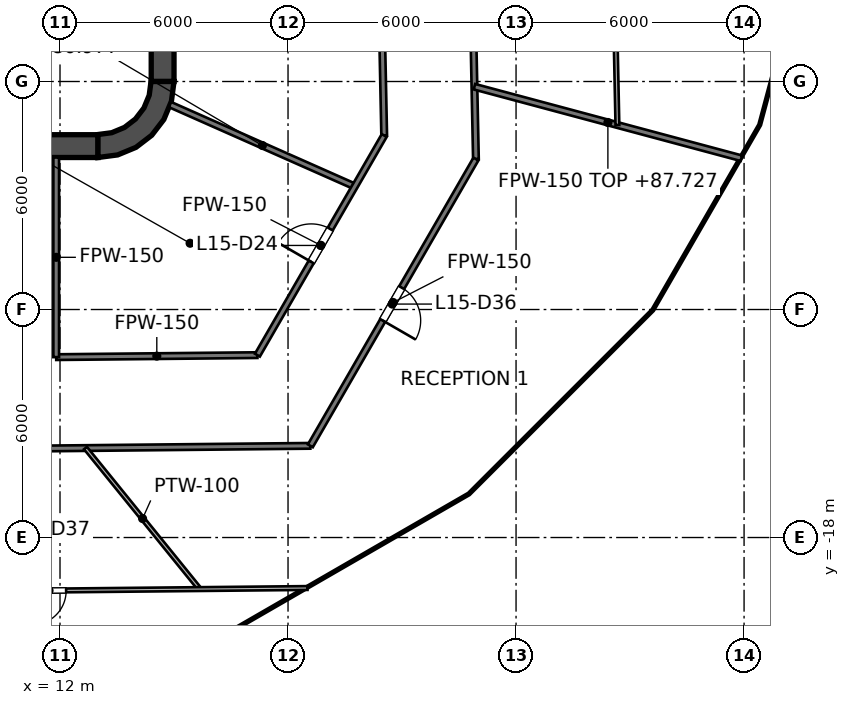
"""IFC4 building model, lengths in metres.
Left out: names, types, materials, properties, quantities, classifications, styles, units other than length and angle.
Written with IfcOpenShell. Run it as: python <this file> out.ifc"""

import sys

from ifc_helpers import new_model, si_unit, direction, frame, frame_2d, origin, place, context, subcontext, project, spatial, polyline, rectangle, outline, extrude, element, fill, save


model = new_model("IFC4")
c1 = context("Model", 3, precision=1e-05, world=origin(), true_north=direction((0.0, 1.0)))
c2 = subcontext(c1, "Body", "Model", "MODEL_VIEW")
j1 = project(units=[si_unit("LENGTHUNIT", "METRE"), si_unit("PLANEANGLEUNIT", "RADIAN")], contexts=[c1])
p1 = place(None, origin())
s1 = spatial("IfcSite", under=j1, at=p1, CompositionType="ELEMENT")
p2 = place(p1, origin())
s2 = spatial("IfcBuilding", under=s1, at=p2, CompositionType="ELEMENT")
p3 = place(p2, frame((0.0, 0.0, 84.0)))
s3 = spatial("IfcBuildingStorey", under=s2, at=p3, CompositionType="ELEMENT", Elevation=84.0)
p4 = place(p3, frame((-13.0, -7.7, 0.0), z_axis=(0.0, 0.0, 1.0), x_axis=(1.0, 0.0, 0.0)))
e1 = element("IfcWall", 1, at=p4, inside=s3, PredefinedType="SHEAR", context=c2, shape_type="SweptSolid", body=[
    extrude(rectangle(XDim=26.0, YDim=0.6, at=frame_2d((13.0, 0.0))), origin(), (0.0, 0.0, 1.0), 4.2),
])
p5 = place(p4, frame((1.7, 0.0, 0.0)))
e2 = element("IfcOpeningElement", 2, at=p5, cuts=e1, PredefinedType="OPENING", context=c2, shape_type="SweptSolid", body=[
    extrude(rectangle(XDim=1.8, YDim=2.1, at=frame_2d((0.9, 1.05))), frame((0.0, 0.3, 0.0), z_axis=(0.0, -1.0, 0.0), x_axis=(1.0, 0.0, 0.0)), (0.0, 0.0, 1.0), 0.6),
])
p6 = place(p4, frame((22.5, 0.0, 0.0)))
e3 = element("IfcOpeningElement", 3, at=p6, cuts=e1, PredefinedType="OPENING", context=c2, shape_type="SweptSolid", body=[
    extrude(rectangle(XDim=1.8, YDim=2.1, at=frame_2d((0.9, 1.05))), frame((0.0, 0.3, 0.0), z_axis=(0.0, -1.0, 0.0), x_axis=(1.0, 0.0, 0.0)), (0.0, 0.0, 1.0), 0.6),
])
p7 = place(p3, frame((14.7, -6.0, 0.0), z_axis=(0.0, 0.0, 1.0), x_axis=(0.0, 1.0, 0.0)))
e4 = element("IfcWall", 4, at=p7, inside=s3, PredefinedType="SHEAR", context=c2, shape_type="SweptSolid", body=[
    extrude(rectangle(XDim=12.0, YDim=0.6, at=frame_2d((6.0, 0.0))), origin(), (0.0, 0.0, 1.0), 4.2),
])
p8 = place(p3, origin())
e5 = element("IfcWall", 5, at=p8, inside=s3, PredefinedType="SHEAR", context=c2, shape_type="SweptSolid", body=[
    extrude(outline(polyline([(15.0, -6.0), (14.395, -6.0), (14.347, -6.361), (14.208, -6.698), (13.986, -6.986), (13.698, -7.208), (13.361, -7.347), (13.0, -7.395), (13.0, -8.0), (13.518, -7.932), (14.0, -7.732), (14.414, -7.414), (14.732, -7.0), (14.932, -6.518), (15.0, -6.0)])), origin(), (0.0, 0.0, 1.0), 4.2),
])
p9 = place(p3, frame((11.8, -7.4, 0.0), z_axis=(0.0, 0.0, 1.0), x_axis=(0.0, 1.0, 0.0)))
e6 = element("IfcWall", 6, at=p9, inside=s3, PredefinedType="SOLIDWALL", context=c2, shape_type="SweptSolid", body=[
    extrude(rectangle(XDim=14.8, YDim=0.4, at=frame_2d((7.4, 0.0))), origin(), (0.0, 0.0, 1.0), 4.05),
])
p10 = place(p9, frame((11.2, 0.0, 0.0)))
e7 = element("IfcOpeningElement", 7, at=p10, cuts=e6, PredefinedType="OPENING", context=c2, shape_type="SweptSolid", body=[
    extrude(rectangle(XDim=1.1, YDim=2.1, at=frame_2d((0.55, 1.05))), frame((0.0, 0.2, 0.0), z_axis=(0.0, -1.0, 0.0), x_axis=(1.0, 0.0, 0.0)), (0.0, 0.0, 1.0), 0.4),
])
p11 = place(p9, frame((8.3, 0.0, 0.0)))
e8 = element("IfcOpeningElement", 8, at=p11, cuts=e6, PredefinedType="OPENING", context=c2, shape_type="SweptSolid", body=[
    extrude(rectangle(XDim=1.1, YDim=2.1, at=frame_2d((0.55, 1.05))), frame((0.0, 0.2, 0.0), z_axis=(0.0, -1.0, 0.0), x_axis=(1.0, 0.0, 0.0)), (0.0, 0.0, 1.0), 0.4),
])
p12 = place(p9, frame((5.4, 0.0, 0.0)))
e9 = element("IfcOpeningElement", 9, at=p12, cuts=e6, PredefinedType="OPENING", context=c2, shape_type="SweptSolid", body=[
    extrude(rectangle(XDim=1.1, YDim=2.1, at=frame_2d((0.55, 1.05))), frame((0.0, 0.2, 0.0), z_axis=(0.0, -1.0, 0.0), x_axis=(1.0, 0.0, 0.0)), (0.0, 0.0, 1.0), 0.4),
])
p13 = place(p9, frame((13.552, 0.0, 0.0)))
e10 = element("IfcOpeningElement", 10, at=p13, cuts=e6, PredefinedType="OPENING", context=c2, shape_type="SweptSolid", body=[
    extrude(rectangle(XDim=0.9, YDim=2.1, at=frame_2d((0.45, 1.05))), frame((0.0, 0.2, 0.0), z_axis=(0.0, -1.0, 0.0), x_axis=(1.0, 0.0, 0.0)), (0.0, 0.0, 1.0), 0.4),
])
p14 = place(p9, frame((0.347, 0.0, 0.0)))
e11 = element("IfcOpeningElement", 11, at=p14, cuts=e6, PredefinedType="OPENING", context=c2, shape_type="SweptSolid", body=[
    extrude(rectangle(XDim=0.9, YDim=2.1, at=frame_2d((0.45, 1.05))), frame((0.0, 0.2, 0.0), z_axis=(0.0, -1.0, 0.0), x_axis=(1.0, 0.0, 0.0)), (0.0, 0.0, 1.0), 0.4),
])
e12 = element("IfcWall", 12, at=p8, inside=s3, PredefinedType="SOLIDWALL", context=c2, shape_type="SweptSolid", body=[
    extrude(outline(polyline([(12.0, -5.675), (12.0, -5.925), (14.15, -5.925), (14.4, -5.925), (14.4, -5.675), (14.4, -3.025), (14.4, -2.775), (14.4, -0.125), (14.4, 0.125), (14.4, 2.775), (14.4, 3.025), (14.4, 5.675), (14.4, 5.925), (14.15, 5.925), (12.0, 5.925), (12.0, 5.675), (14.15, 5.675), (14.15, 3.025), (12.0, 3.025), (12.0, 2.775), (14.15, 2.775), (14.15, 0.125), (12.0, 0.125), (12.0, -0.125), (14.15, -0.125), (14.15, -2.775), (12.0, -2.775), (12.0, -3.025), (14.15, -3.025), (14.15, -5.675), (12.0, -5.675)])), origin(), (0.0, 0.0, 1.0), 4.05),
])
p15 = place(p3, frame((20.167, 10.213, 0.0), z_axis=(0.0, 0.0, 1.0), x_axis=(0.020610894613, -0.999787572949, 0.0)))
e13 = element("IfcWall", 13, at=p15, inside=s3, PredefinedType="PARTITIONING", context=c2, shape_type="SweptSolid", body=[
    extrude(rectangle(XDim=17.637, YDim=0.15, at=frame_2d((8.819, 0.0))), origin(), (0.0, 0.0, 1.0), 2.968),
])
p16 = place(p15, frame((10.508, 0.0, 0.0)))
e14 = element("IfcOpeningElement", 14, at=p16, cuts=e13, PredefinedType="OPENING", context=c2, shape_type="SweptSolid", body=[
    extrude(rectangle(XDim=1.0, YDim=2.1, at=frame_2d((0.5, 1.05))), frame((0.0, 0.075, 0.0), z_axis=(0.0, -1.0, 0.0), x_axis=(1.0, 0.0, 0.0)), (0.0, 0.0, 1.0), 0.15),
])
p17 = place(p15, frame((5.09, 0.0, 0.0)))
e15 = element("IfcOpeningElement", 15, at=p17, cuts=e13, PredefinedType="OPENING", context=c2, shape_type="SweptSolid", body=[
    extrude(rectangle(XDim=1.0, YDim=2.1, at=frame_2d((0.5, 1.05))), frame((0.0, 0.075, 0.0), z_axis=(0.0, -1.0, 0.0), x_axis=(1.0, 0.0, 0.0)), (0.0, 0.0, 1.0), 0.15),
])
p18 = place(p3, frame((22.539, 11.615, 0.0), z_axis=(0.0, 0.0, 1.0), x_axis=(0.020601506683, -0.99978776644, 0.0)))
e16 = element("IfcWall", 16, at=p18, inside=s3, PredefinedType="PARTITIONING", context=c2, shape_type="SweptSolid", body=[
    extrude(rectangle(XDim=19.66, YDim=0.15, at=frame_2d((9.83, 0.0))), origin(), (0.0, 0.0, 1.0), 2.968),
])
p19 = place(p18, frame((13.54, 0.0, 0.0)))
e17 = element("IfcOpeningElement", 17, at=p19, cuts=e16, PredefinedType="OPENING", context=c2, shape_type="SweptSolid", body=[
    extrude(rectangle(XDim=1.0, YDim=2.1, at=frame_2d((0.5, 1.05))), frame((0.0, 0.075, 0.0), z_axis=(0.0, -1.0, 0.0), x_axis=(1.0, 0.0, 0.0)), (0.0, 0.0, 1.0), 0.15),
])
p20 = place(p18, frame((9.23, 0.0, 0.0)))
e18 = element("IfcOpeningElement", 18, at=p20, cuts=e16, PredefinedType="OPENING", context=c2, shape_type="SweptSolid", body=[
    extrude(rectangle(XDim=1.0, YDim=2.1, at=frame_2d((0.5, 1.05))), frame((0.0, 0.075, 0.0), z_axis=(0.0, -1.0, 0.0), x_axis=(1.0, 0.0, 0.0)), (0.0, 0.0, 1.0), 0.15),
])
p21 = place(p3, frame((14.895, -6.607, 0.0), z_axis=(0.0, 0.0, 1.0), x_axis=(0.914233271379, -0.405188259337, 0.0)))
e19 = element("IfcWall", 19, at=p21, inside=s3, PredefinedType="PARTITIONING", context=c2, shape_type="SweptSolid", body=[
    extrude(rectangle(XDim=5.317, YDim=0.15, at=frame_2d((2.659, 0.0))), origin(), (0.0, 0.0, 1.0), 2.977),
])
p22 = place(p3, frame((22.905, -6.137, 0.0), z_axis=(0.0, 0.0, 1.0), x_axis=(0.965915974273, -0.258855810529, 0.0)))
e20 = element("IfcWall", 20, at=p22, inside=s3, PredefinedType="PARTITIONING", context=c2, shape_type="SweptSolid", body=[
    extrude(rectangle(XDim=7.271, YDim=0.15, at=frame_2d((3.635, 0.0))), origin(), (0.0, 0.0, 1.0), 3.727),
])
p23 = place(p3, frame((-14.534, -15.916, 0.0), z_axis=(0.0, 0.0, 1.0), x_axis=(0.999950930262, 0.009906415532, 0.0)))
e21 = element("IfcWall", 21, at=p23, inside=s3, PredefinedType="PARTITIONING", context=c2, shape_type="SweptSolid", body=[
    extrude(rectangle(XDim=33.123, YDim=0.15, at=frame_2d((16.561, 0.0))), origin(), (0.0, 0.0, 1.0), 2.968),
])
p24 = place(p23, frame((22.477, 0.0, 0.0)))
e22 = element("IfcOpeningElement", 22, at=p24, cuts=e21, PredefinedType="OPENING", context=c2, shape_type="SweptSolid", body=[
    extrude(rectangle(XDim=1.0, YDim=2.1, at=frame_2d((0.5, 1.05))), frame((0.0, 0.075, 0.0), z_axis=(0.0, -1.0, 0.0), x_axis=(1.0, 0.0, 0.0)), (0.0, 0.0, 1.0), 0.15),
])
p25 = place(p23, frame((7.723, 0.0, 0.0)))
e23 = element("IfcOpeningElement", 23, at=p25, cuts=e21, PredefinedType="OPENING", context=c2, shape_type="SweptSolid", body=[
    extrude(rectangle(XDim=1.0, YDim=2.1, at=frame_2d((0.5, 1.05))), frame((0.0, 0.075, 0.0), z_axis=(0.0, -1.0, 0.0), x_axis=(1.0, 0.0, 0.0)), (0.0, 0.0, 1.0), 0.15),
])
p26 = place(p23, frame((16.111, 0.0, 0.0)))
e24 = element("IfcOpeningElement", 24, at=p26, cuts=e21, PredefinedType="OPENING", context=c2, shape_type="SweptSolid", body=[
    extrude(rectangle(XDim=1.0, YDim=2.1, at=frame_2d((0.5, 1.05))), frame((0.0, 0.075, 0.0), z_axis=(0.0, -1.0, 0.0), x_axis=(1.0, 0.0, 0.0)), (0.0, 0.0, 1.0), 0.15),
])
p27 = place(p3, frame((11.9, -13.253, 0.0), z_axis=(0.0, 0.0, 1.0), x_axis=(0.999950853109, 0.009914200296, 0.0)))
e25 = element("IfcWall", 25, at=p27, inside=s3, PredefinedType="PARTITIONING", context=c2, shape_type="SweptSolid", body=[
    extrude(rectangle(XDim=5.294, YDim=0.15, at=frame_2d((2.647, 0.0))), origin(), (0.0, 0.0, 1.0), 2.968),
])
p28 = place(p3, frame((18.587, -15.587, 0.0), z_axis=(0.0, 0.0, 1.0), x_axis=(0.500026433136, 0.866010142069, 0.0)))
e26 = element("IfcWall", 26, at=p28, inside=s3, PredefinedType="PARTITIONING", context=c2, shape_type="SweptSolid", body=[
    extrude(rectangle(XDim=8.713, YDim=0.15, at=frame_2d((4.357, 0.0))), origin(), (0.0, 0.0, 1.0), 2.968),
])
p29 = place(p28, frame((3.807, 0.0, 0.0)))
e27 = element("IfcOpeningElement", 27, at=p29, cuts=e26, PredefinedType="OPENING", context=c2, shape_type="SweptSolid", body=[
    extrude(rectangle(XDim=1.0, YDim=2.1, at=frame_2d((0.5, 1.05))), frame((0.0, 0.075, 0.0), z_axis=(0.0, -1.0, 0.0), x_axis=(1.0, 0.0, 0.0)), (0.0, 0.0, 1.0), 0.15),
])
p30 = place(p3, frame((17.194, -13.201, 0.0), z_axis=(0.0, 0.0, 1.0), x_axis=(0.50001062018, 0.866019272134, 0.0)))
e28 = element("IfcWall", 28, at=p30, inside=s3, PredefinedType="PARTITIONING", context=c2, shape_type="SweptSolid", body=[
    extrude(rectangle(XDim=6.674, YDim=0.15, at=frame_2d((3.337, 0.0))), origin(), (0.0, 0.0, 1.0), 2.968),
])
p31 = place(p30, frame((2.833, 0.0, 0.0)))
e29 = element("IfcOpeningElement", 29, at=p31, cuts=e28, PredefinedType="OPENING", context=c2, shape_type="SweptSolid", body=[
    extrude(rectangle(XDim=1.0, YDim=2.1, at=frame_2d((0.5, 1.05))), frame((0.0, 0.075, 0.0), z_axis=(0.0, -1.0, 0.0), x_axis=(1.0, 0.0, 0.0)), (0.0, 0.0, 1.0), 0.15),
])
p32 = place(p3, frame((11.9, -13.253, 0.0), z_axis=(0.0, 0.0, 1.0), x_axis=(0.0, 1.0, 0.0)))
e30 = element("IfcWall", 30, at=p32, inside=s3, PredefinedType="PARTITIONING", context=c2, shape_type="SweptSolid", body=[
    extrude(rectangle(XDim=5.253, YDim=0.15, at=frame_2d((2.626, 0.0))), origin(), (0.0, 0.0, 1.0), 2.968),
])
p33 = place(p3, frame((26.243, 13.397, 0.0), z_axis=(0.0, 0.0, 1.0), x_axis=(0.020639766813, -0.999786977324, 0.0)))
e31 = element("IfcWall", 31, at=p33, inside=s3, PredefinedType="PARTITIONING", context=c2, shape_type="SweptSolid", body=[
    extrude(rectangle(XDim=20.546, YDim=0.1, at=frame_2d((10.273, 0.0))), origin(), (0.0, 0.0, 1.0), 2.968),
])
p34 = place(p33, frame((5.506, 0.0, 0.0)))
e32 = element("IfcOpeningElement", 32, at=p34, cuts=e31, PredefinedType="OPENING", context=c2, shape_type="SweptSolid", body=[
    extrude(rectangle(XDim=0.9, YDim=2.1, at=frame_2d((0.45, 1.05))), frame((0.0, 0.05, 0.0), z_axis=(0.0, -1.0, 0.0), x_axis=(1.0, 0.0, 0.0)), (0.0, 0.0, 1.0), 0.1),
])
p35 = place(p3, frame((12.67, -15.646, 0.0), z_axis=(0.0, 0.0, 1.0), x_axis=(0.629429152062, -0.777057875923, 0.0)))
e33 = element("IfcWall", 33, at=p35, inside=s3, PredefinedType="PARTITIONING", context=c2, shape_type="SweptSolid", body=[
    extrude(rectangle(XDim=4.774, YDim=0.1, at=frame_2d((2.387, 0.0))), origin(), (0.0, 0.0, 1.0), 3.9),
])
p36 = place(p3, frame((-15.26, -19.663, 0.0), z_axis=(0.0, 0.0, 1.0), x_axis=(0.999951032014, 0.009896139397, 0.0)))
e34 = element("IfcWall", 34, at=p36, inside=s3, PredefinedType="PARTITIONING", context=c2, shape_type="SweptSolid", body=[
    extrude(rectangle(XDim=33.774, YDim=0.1, at=frame_2d((16.887, 0.0))), origin(), (0.0, 0.0, 1.0), 2.968),
])
p37 = place(p36, frame((26.523, 0.0, 0.0)))
e35 = element("IfcOpeningElement", 35, at=p37, cuts=e34, PredefinedType="OPENING", context=c2, shape_type="SweptSolid", body=[
    extrude(rectangle(XDim=0.9, YDim=2.1, at=frame_2d((0.45, 1.05))), frame((0.0, 0.05, 0.0), z_axis=(0.0, -1.0, 0.0), x_axis=(1.0, 0.0, 0.0)), (0.0, 0.0, 1.0), 0.1),
])
p38 = place(p36, frame((2.43, 0.0, 0.0)))
e36 = element("IfcOpeningElement", 36, at=p38, cuts=e34, PredefinedType="OPENING", context=c2, shape_type="SweptSolid", body=[
    extrude(rectangle(XDim=0.9, YDim=2.1, at=frame_2d((0.45, 1.05))), frame((0.0, 0.05, 0.0), z_axis=(0.0, -1.0, 0.0), x_axis=(1.0, 0.0, 0.0)), (0.0, 0.0, 1.0), 0.1),
])
p39 = place(p36, frame((15.34, 0.0, 0.0)))
e37 = element("IfcOpeningElement", 37, at=p39, cuts=e34, PredefinedType="OPENING", context=c2, shape_type="SweptSolid", body=[
    extrude(rectangle(XDim=0.9, YDim=2.1, at=frame_2d((0.45, 1.05))), frame((0.0, 0.05, 0.0), z_axis=(0.0, -1.0, 0.0), x_axis=(1.0, 0.0, 0.0)), (0.0, 0.0, 1.0), 0.1),
])
p40 = place(p14, origin())
e38 = element("IfcDoor", 38, at=p40, inside=s3, OperationType="SINGLE_SWING_RIGHT", PredefinedType="DOOR", context=c2, shape_type="SweptSolid", body=[
    extrude(rectangle(XDim=0.9, YDim=2.1, at=frame_2d((0.45, 1.05))), frame((0.0, 0.025, 0.0), z_axis=(0.0, -1.0, 0.0), x_axis=(1.0, 0.0, 0.0)), (0.0, 0.0, 1.0), 0.05),
])
fill(e11, e38)
p41 = place(p31, origin())
e39 = element("IfcDoor", 39, at=p41, inside=s3, OperationType="SINGLE_SWING_LEFT", PredefinedType="DOOR", context=c2, shape_type="SweptSolid", body=[
    extrude(rectangle(XDim=1.0, YDim=2.1, at=frame_2d((0.5, 1.05))), frame((0.0, 0.025, 0.0), z_axis=(0.0, -1.0, 0.0), x_axis=(1.0, 0.0, 0.0)), (0.0, 0.0, 1.0), 0.05),
])
fill(e29, e39)
p42 = place(p29, origin())
e40 = element("IfcDoor", 40, at=p42, inside=s3, OperationType="SINGLE_SWING_LEFT", PredefinedType="DOOR", context=c2, shape_type="SweptSolid", body=[
    extrude(rectangle(XDim=1.0, YDim=2.1, at=frame_2d((0.5, 1.05))), frame((0.0, 0.025, 0.0), z_axis=(0.0, -1.0, 0.0), x_axis=(1.0, 0.0, 0.0)), (0.0, 0.0, 1.0), 0.05),
])
fill(e27, e40)
p43 = place(p37, origin())
e41 = element("IfcDoor", 41, at=p43, inside=s3, OperationType="SINGLE_SWING_LEFT", PredefinedType="DOOR", context=c2, shape_type="SweptSolid", body=[
    extrude(rectangle(XDim=0.9, YDim=2.1, at=frame_2d((0.45, 1.05))), frame((0.0, 0.025, 0.0), z_axis=(0.0, -1.0, 0.0), x_axis=(1.0, 0.0, 0.0)), (0.0, 0.0, 1.0), 0.05),
])
fill(e35, e41)
save(model, sys.argv[1])
